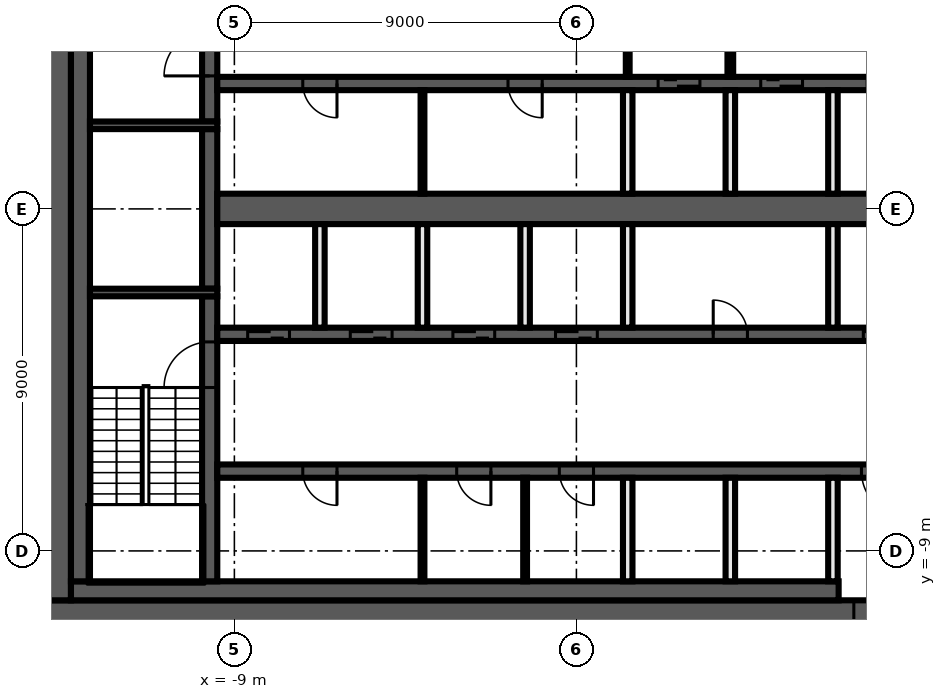
"""IFC4 building model, lengths in metres.
Left out: names, types, materials, properties, quantities, classifications, styles, units other than length and angle.
Written with IfcOpenShell. Run it as: python <this file> out.ifc"""

import sys

from ifc_helpers import new_model, si_unit, direction, frame, frame_2d, origin, place, context, subcontext, project, spatial, rectangle, extrude, element, fill, save


model = new_model("IFC4")
c1 = context("Model", 3, precision=1e-05, world=origin(), true_north=direction((0.0, 1.0)))
c2 = subcontext(c1, "Body", "Model", "MODEL_VIEW")
j1 = project(units=[si_unit("LENGTHUNIT", "METRE"), si_unit("PLANEANGLEUNIT", "RADIAN")], contexts=[c1])
p1 = place(None, origin())
s1 = spatial("IfcSite", under=j1, at=p1, CompositionType="ELEMENT")
p2 = place(p1, origin())
s2 = spatial("IfcBuilding", under=s1, at=p2, CompositionType="ELEMENT")
p3 = place(p2, frame((0.0, 0.0, 245.4)))
s3 = spatial("IfcBuildingStorey", under=s2, at=p3, CompositionType="ELEMENT", Elevation=245.4)
p4 = place(p3, frame((14.0, -10.65, 0.0), z_axis=(0.0, 0.0, 1.0), x_axis=(-1.0, 0.0, 0.0)))
e1 = element("IfcWall", 1, at=p4, inside=s3, PredefinedType="SHEAR", context=c2, shape_type="SweptSolid", body=[
    extrude(rectangle(XDim=28.0, YDim=0.7, at=frame_2d((14.0, 0.0))), origin(), (0.0, 0.0, 1.0), 3.82),
])
p5 = place(p4, frame((5.1, 0.0, 0.0)))
e2 = element("IfcOpeningElement", 2, at=p5, cuts=e1, PredefinedType="OPENING", context=c2, shape_type="SweptSolid", body=[
    extrude(rectangle(XDim=1.6, YDim=2.1, at=frame_2d((0.8, 1.05))), frame((0.0, 0.36, 0.0), z_axis=(0.0, -1.0, 0.0), x_axis=(1.0, 0.0, 0.0)), (0.0, 0.0, 1.0), 0.72),
])
p6 = place(p3, frame((-13.65, -10.3, 0.0), z_axis=(0.0, 0.0, 1.0), x_axis=(0.0, 1.0, 0.0)))
e3 = element("IfcWall", 3, at=p6, inside=s3, PredefinedType="SHEAR", context=c2, shape_type="SweptSolid", body=[
    extrude(rectangle(XDim=20.6, YDim=0.7, at=frame_2d((10.3, 0.0))), origin(), (0.0, 0.0, 1.0), 3.82),
])
p7 = place(p3, frame((6.9, -10.05, 0.0), z_axis=(0.0, 0.0, 1.0), x_axis=(-1.0, 0.0, 0.0)))
e4 = element("IfcWall", 4, at=p7, inside=s3, PredefinedType="SHEAR", context=c2, shape_type="SweptSolid", body=[
    extrude(rectangle(XDim=20.2, YDim=0.5, at=frame_2d((10.1, 0.0))), origin(), (0.0, 0.0, 1.0), 3.82),
])
p8 = place(p3, frame((-13.05, -9.8, 0.0), z_axis=(0.0, 0.0, 1.0), x_axis=(0.0, 1.0, 0.0)))
e5 = element("IfcWall", 5, at=p8, inside=s3, PredefinedType="SHEAR", context=c2, shape_type="SweptSolid", body=[
    extrude(rectangle(XDim=19.6, YDim=0.5, at=frame_2d((9.8, 0.0))), origin(), (0.0, 0.0, 1.0), 3.82),
])
p9 = place(p3, frame((-9.65, -9.8, 0.0), z_axis=(0.0, 0.0, 1.0), x_axis=(0.0, 1.0, 0.0)))
e6 = element("IfcWall", 6, at=p9, inside=s3, PredefinedType="SHEAR", context=c2, shape_type="SweptSolid", body=[
    extrude(rectangle(XDim=7.5, YDim=0.4, at=frame_2d((3.75, 0.0))), origin(), (0.0, 0.0, 1.0), 3.82),
])
p10 = place(p9, frame((5.1, 0.0, 0.0)))
e7 = element("IfcOpeningElement", 7, at=p10, cuts=e6, PredefinedType="OPENING", context=c2, shape_type="SweptSolid", body=[
    extrude(rectangle(XDim=1.2, YDim=2.1, at=frame_2d((0.6, 1.05))), frame((0.0, 0.21, 0.0), z_axis=(0.0, -1.0, 0.0), x_axis=(1.0, 0.0, 0.0)), (0.0, 0.0, 1.0), 0.42),
])
p11 = place(p3, frame((-9.65, -2.1, 0.0), z_axis=(0.0, 0.0, 1.0), x_axis=(0.0, 1.0, 0.0)))
e8 = element("IfcWall", 8, at=p11, inside=s3, PredefinedType="SHEAR", context=c2, shape_type="SweptSolid", body=[
    extrude(rectangle(XDim=4.2, YDim=0.4, at=frame_2d((2.1, 0.0))), origin(), (0.0, 0.0, 1.0), 3.82),
])
p12 = place(p3, frame((-9.65, 2.3, 0.0), z_axis=(0.0, 0.0, 1.0), x_axis=(0.0, 1.0, 0.0)))
e9 = element("IfcWall", 9, at=p12, inside=s3, PredefinedType="SHEAR", context=c2, shape_type="SweptSolid", body=[
    extrude(rectangle(XDim=7.5, YDim=0.4, at=frame_2d((3.75, 0.0))), origin(), (0.0, 0.0, 1.0), 3.82),
])
p13 = place(p12, frame((1.2, 0.0, 0.0)))
e10 = element("IfcOpeningElement", 10, at=p13, cuts=e9, PredefinedType="OPENING", context=c2, shape_type="SweptSolid", body=[
    extrude(rectangle(XDim=1.2, YDim=2.1, at=frame_2d((0.6, 1.05))), frame((0.0, 0.21, 0.0), z_axis=(0.0, -1.0, 0.0), x_axis=(1.0, 0.0, 0.0)), (0.0, 0.0, 1.0), 0.42),
])
for number, where, z_axis, x_axis in (
    (11, (-9.45, 2.2, 0.0), (0.0, 0.0, 1.0), (-1.0, 0.0, 0.0)),
    (12, (-9.45, -2.2, 0.0), (0.0, 0.0, 1.0), (-1.0, 0.0, 0.0)),
):
    element("IfcWall", number, at=place(p3, frame(where, z_axis=z_axis, x_axis=x_axis)), inside=s3, PredefinedType="SHEAR", context=c2, shape_type="SweptSolid", body=[
        extrude(rectangle(XDim=3.35, YDim=0.2, at=frame_2d((1.675, 0.0))), origin(), (0.0, 0.0, 1.0), 3.82),
    ])
p14 = place(p3, frame((9.45, 3.3, 0.0), z_axis=(0.0, 0.0, 1.0), x_axis=(-1.0, 0.0, 0.0)))
e13 = element("IfcWall", 13, at=p14, inside=s3, PredefinedType="SHEAR", context=c2, shape_type="SweptSolid", body=[
    extrude(rectangle(XDim=18.9, YDim=0.35, at=frame_2d((9.45, 0.0))), origin(), (0.0, 0.0, 1.0), 3.82),
])
p15 = place(p14, frame((6.2, 0.0, 0.0)))
e14 = element("IfcOpeningElement", 14, at=p15, cuts=e13, PredefinedType="OPENING", context=c2, shape_type="SweptSolid", body=[
    extrude(rectangle(XDim=1.1, YDim=2.1, at=frame_2d((0.55, 1.05))), frame((0.0, 0.185, 0.0), z_axis=(0.0, -1.0, 0.0), x_axis=(1.0, 0.0, 0.0)), (0.0, 0.0, 1.0), 0.37),
])
p16 = place(p14, frame((3.5, 0.0, 0.0)))
e15 = element("IfcOpeningElement", 15, at=p16, cuts=e13, PredefinedType="OPENING", context=c2, shape_type="SweptSolid", body=[
    extrude(rectangle(XDim=1.1, YDim=2.1, at=frame_2d((0.55, 1.05))), frame((0.0, 0.185, 0.0), z_axis=(0.0, -1.0, 0.0), x_axis=(1.0, 0.0, 0.0)), (0.0, 0.0, 1.0), 0.37),
])
p17 = place(p14, frame((0.9, 0.0, 0.0)))
e16 = element("IfcOpeningElement", 16, at=p17, cuts=e13, PredefinedType="OPENING", context=c2, shape_type="SweptSolid", body=[
    extrude(rectangle(XDim=0.9, YDim=2.1, at=frame_2d((0.45, 1.05))), frame((0.0, 0.185, 0.0), z_axis=(0.0, -1.0, 0.0), x_axis=(1.0, 0.0, 0.0)), (0.0, 0.0, 1.0), 0.37),
])
p18 = place(p14, frame((15.75, 0.0, 0.0)))
e17 = element("IfcOpeningElement", 17, at=p18, cuts=e13, PredefinedType="OPENING", context=c2, shape_type="SweptSolid", body=[
    extrude(rectangle(XDim=0.9, YDim=2.1, at=frame_2d((0.45, 1.05))), frame((0.0, 0.185, 0.0), z_axis=(0.0, -1.0, 0.0), x_axis=(1.0, 0.0, 0.0)), (0.0, 0.0, 1.0), 0.37),
])
p19 = place(p14, frame((10.35, 0.0, 0.0)))
e18 = element("IfcOpeningElement", 18, at=p19, cuts=e13, PredefinedType="OPENING", context=c2, shape_type="SweptSolid", body=[
    extrude(rectangle(XDim=0.9, YDim=2.1, at=frame_2d((0.45, 1.05))), frame((0.0, 0.185, 0.0), z_axis=(0.0, -1.0, 0.0), x_axis=(1.0, 0.0, 0.0)), (0.0, 0.0, 1.0), 0.37),
])
p20 = place(p3, frame((-9.45, -3.3, 0.0), z_axis=(0.0, 0.0, 1.0), x_axis=(1.0, 0.0, 0.0)))
e19 = element("IfcWall", 19, at=p20, inside=s3, PredefinedType="SHEAR", context=c2, shape_type="SweptSolid", body=[
    extrude(rectangle(XDim=18.9, YDim=0.35, at=frame_2d((9.45, 0.0))), origin(), (0.0, 0.0, 1.0), 3.82),
])
p21 = place(p20, frame((0.8, 0.0, 0.0)))
e20 = element("IfcOpeningElement", 20, at=p21, cuts=e19, PredefinedType="OPENING", context=c2, shape_type="SweptSolid", body=[
    extrude(rectangle(XDim=1.1, YDim=2.1, at=frame_2d((0.55, 1.05))), frame((0.0, 0.185, 0.0), z_axis=(0.0, -1.0, 0.0), x_axis=(1.0, 0.0, 0.0)), (0.0, 0.0, 1.0), 0.37),
])
p22 = place(p20, frame((3.5, 0.0, 0.0)))
e21 = element("IfcOpeningElement", 21, at=p22, cuts=e19, PredefinedType="OPENING", context=c2, shape_type="SweptSolid", body=[
    extrude(rectangle(XDim=1.1, YDim=2.1, at=frame_2d((0.55, 1.05))), frame((0.0, 0.185, 0.0), z_axis=(0.0, -1.0, 0.0), x_axis=(1.0, 0.0, 0.0)), (0.0, 0.0, 1.0), 0.37),
])
p23 = place(p20, frame((6.2, 0.0, 0.0)))
e22 = element("IfcOpeningElement", 22, at=p23, cuts=e19, PredefinedType="OPENING", context=c2, shape_type="SweptSolid", body=[
    extrude(rectangle(XDim=1.1, YDim=2.1, at=frame_2d((0.55, 1.05))), frame((0.0, 0.185, 0.0), z_axis=(0.0, -1.0, 0.0), x_axis=(1.0, 0.0, 0.0)), (0.0, 0.0, 1.0), 0.37),
])
p24 = place(p20, frame((8.9, 0.0, 0.0)))
e23 = element("IfcOpeningElement", 23, at=p24, cuts=e19, PredefinedType="OPENING", context=c2, shape_type="SweptSolid", body=[
    extrude(rectangle(XDim=1.1, YDim=2.1, at=frame_2d((0.55, 1.05))), frame((0.0, 0.185, 0.0), z_axis=(0.0, -1.0, 0.0), x_axis=(1.0, 0.0, 0.0)), (0.0, 0.0, 1.0), 0.37),
])
p25 = place(p20, frame((17.0, 0.0, 0.0)))
e24 = element("IfcOpeningElement", 24, at=p25, cuts=e19, PredefinedType="OPENING", context=c2, shape_type="SweptSolid", body=[
    extrude(rectangle(XDim=1.1, YDim=2.1, at=frame_2d((0.55, 1.05))), frame((0.0, 0.185, 0.0), z_axis=(0.0, -1.0, 0.0), x_axis=(1.0, 0.0, 0.0)), (0.0, 0.0, 1.0), 0.37),
])
p26 = place(p20, frame((13.05, 0.0, 0.0)))
e25 = element("IfcOpeningElement", 25, at=p26, cuts=e19, PredefinedType="OPENING", context=c2, shape_type="SweptSolid", body=[
    extrude(rectangle(XDim=0.9, YDim=2.1, at=frame_2d((0.45, 1.05))), frame((0.0, 0.185, 0.0), z_axis=(0.0, -1.0, 0.0), x_axis=(1.0, 0.0, 0.0)), (0.0, 0.0, 1.0), 0.37),
])
p27 = place(p3, frame((9.45, -6.9, 0.0), z_axis=(0.0, 0.0, 1.0), x_axis=(-1.0, 0.0, 0.0)))
e26 = element("IfcWall", 26, at=p27, inside=s3, PredefinedType="SHEAR", context=c2, shape_type="SweptSolid", body=[
    extrude(rectangle(XDim=18.9, YDim=0.35, at=frame_2d((9.45, 0.0))), origin(), (0.0, 0.0, 1.0), 3.82),
])
p28 = place(p27, frame((0.75, 0.0, 0.0)))
e27 = element("IfcOpeningElement", 27, at=p28, cuts=e26, PredefinedType="OPENING", context=c2, shape_type="SweptSolid", body=[
    extrude(rectangle(XDim=1.2, YDim=2.1, at=frame_2d((0.6, 1.05))), frame((0.0, 0.185, 0.0), z_axis=(0.0, -1.0, 0.0), x_axis=(1.0, 0.0, 0.0)), (0.0, 0.0, 1.0), 0.37),
])
p29 = place(p27, frame((15.75, 0.0, 0.0)))
e28 = element("IfcOpeningElement", 28, at=p29, cuts=e26, PredefinedType="OPENING", context=c2, shape_type="SweptSolid", body=[
    extrude(rectangle(XDim=0.9, YDim=2.1, at=frame_2d((0.45, 1.05))), frame((0.0, 0.185, 0.0), z_axis=(0.0, -1.0, 0.0), x_axis=(1.0, 0.0, 0.0)), (0.0, 0.0, 1.0), 0.37),
])
p30 = place(p27, frame((11.7, 0.0, 0.0)))
e29 = element("IfcOpeningElement", 29, at=p30, cuts=e26, PredefinedType="OPENING", context=c2, shape_type="SweptSolid", body=[
    extrude(rectangle(XDim=0.9, YDim=2.1, at=frame_2d((0.45, 1.05))), frame((0.0, 0.185, 0.0), z_axis=(0.0, -1.0, 0.0), x_axis=(1.0, 0.0, 0.0)), (0.0, 0.0, 1.0), 0.37),
])
p31 = place(p27, frame((9.0, 0.0, 0.0)))
e30 = element("IfcOpeningElement", 30, at=p31, cuts=e26, PredefinedType="OPENING", context=c2, shape_type="SweptSolid", body=[
    extrude(rectangle(XDim=0.9, YDim=2.1, at=frame_2d((0.45, 1.05))), frame((0.0, 0.185, 0.0), z_axis=(0.0, -1.0, 0.0), x_axis=(1.0, 0.0, 0.0)), (0.0, 0.0, 1.0), 0.37),
])
p32 = place(p3, frame((-9.45, 0.0, 0.0), z_axis=(0.0, 0.0, 1.0), x_axis=(1.0, 0.0, 0.0)))
e31 = element("IfcWall", 31, at=p32, inside=s3, PredefinedType="SHEAR", context=c2, shape_type="SweptSolid", body=[
    extrude(rectangle(XDim=18.9, YDim=0.8, at=frame_2d((9.45, 0.0))), origin(), (0.0, 0.0, 1.0), 3.82),
])
for number, where, z_axis, x_axis in (
    (32, (6.75, -9.8, 0.0), (0.0, 0.0, 1.0), (0.0, 1.0, 0.0)),
    (33, (6.75, -3.125, 0.0), (0.0, 0.0, 1.0), (0.0, 1.0, 0.0)),
    (34, (6.75, 0.4, 0.0), (0.0, 0.0, 1.0), (0.0, 1.0, 0.0)),
):
    element("IfcWall", number, at=place(p3, frame(where, z_axis=z_axis, x_axis=x_axis)), inside=s3, PredefinedType="SOLIDWALL", context=c2, shape_type="SweptSolid", body=[
        extrude(rectangle(XDim=2.725, YDim=0.25, at=frame_2d((1.363, 0.0))), origin(), (0.0, 0.0, 1.0), 3.82),
    ])
p33 = place(p3, frame((4.05, 6.725, 0.0), z_axis=(0.0, 0.0, 1.0), x_axis=(0.0, -1.0, 0.0)))
e35 = element("IfcWall", 35, at=p33, inside=s3, PredefinedType="PARTITIONING", context=c2, shape_type="SweptSolid", body=[
    extrude(rectangle(XDim=3.25, YDim=0.15, at=frame_2d((1.625, 0.0))), origin(), (0.0, 0.0, 1.0), 3.82),
])
p34 = place(p33, frame((1.025, 0.0, 0.0)))
e36 = element("IfcOpeningElement", 36, at=p34, cuts=e35, PredefinedType="OPENING", context=c2, shape_type="SweptSolid", body=[
    extrude(rectangle(XDim=1.2, YDim=2.1, at=frame_2d((0.6, 1.05))), frame((0.0, 0.085, 0.0), z_axis=(0.0, -1.0, 0.0), x_axis=(1.0, 0.0, 0.0)), (0.0, 0.0, 1.0), 0.17),
])
for number, where, z_axis, x_axis in (
    (37, (4.05, -9.8, 0.0), (0.0, 0.0, 1.0), (0.0, 1.0, 0.0)),
    (38, (4.05, 0.4, 0.0), (0.0, 0.0, 1.0), (0.0, 1.0, 0.0)),
):
    element("IfcWall", number, at=place(p3, frame(where, z_axis=z_axis, x_axis=x_axis)), inside=s3, PredefinedType="SOLIDWALL", context=c2, shape_type="SweptSolid", body=[
        extrude(rectangle(XDim=2.725, YDim=0.25, at=frame_2d((1.363, 0.0))), origin(), (0.0, 0.0, 1.0), 3.82),
    ])
p35 = place(p3, frame((1.35, 6.725, 0.0), z_axis=(0.0, 0.0, 1.0), x_axis=(0.0, -1.0, 0.0)))
e39 = element("IfcWall", 39, at=p35, inside=s3, PredefinedType="PARTITIONING", context=c2, shape_type="SweptSolid", body=[
    extrude(rectangle(XDim=3.25, YDim=0.1, at=frame_2d((1.625, 0.0))), origin(), (0.0, 0.0, 1.0), 3.82),
])
p36 = place(p35, frame((1.025, 0.0, 0.0)))
e40 = element("IfcOpeningElement", 40, at=p36, cuts=e39, PredefinedType="OPENING", context=c2, shape_type="SweptSolid", body=[
    extrude(rectangle(XDim=1.2, YDim=2.1, at=frame_2d((0.6, 1.05))), frame((0.0, 0.06, 0.0), z_axis=(0.0, -1.0, 0.0), x_axis=(1.0, 0.0, 0.0)), (0.0, 0.0, 1.0), 0.12),
])
for number, where, z_axis, x_axis in (
    (41, (1.35, -9.8, 0.0), (0.0, 0.0, 1.0), (0.0, 1.0, 0.0)),
    (42, (1.35, -3.125, 0.0), (0.0, 0.0, 1.0), (0.0, 1.0, 0.0)),
    (43, (1.35, 0.4, 0.0), (0.0, 0.0, 1.0), (0.0, 1.0, 0.0)),
):
    element("IfcWall", number, at=place(p3, frame(where, z_axis=z_axis, x_axis=x_axis)), inside=s3, PredefinedType="SOLIDWALL", context=c2, shape_type="SweptSolid", body=[
        extrude(rectangle(XDim=2.725, YDim=0.25, at=frame_2d((1.363, 0.0))), origin(), (0.0, 0.0, 1.0), 3.82),
    ])
p37 = place(p3, frame((-1.35, -9.8, 0.0), z_axis=(0.0, 0.0, 1.0), x_axis=(0.0, 1.0, 0.0)))
e44 = element("IfcWall", 44, at=p37, inside=s3, PredefinedType="PARTITIONING", context=c2, shape_type="SweptSolid", body=[
    extrude(rectangle(XDim=2.725, YDim=0.1, at=frame_2d((1.363, 0.0))), origin(), (0.0, 0.0, 1.0), 3.82),
])
p38 = place(p3, frame((-1.35, -3.125, 0.0), z_axis=(0.0, 0.0, 1.0), x_axis=(0.0, 1.0, 0.0)))
e45 = element("IfcWall", 45, at=p38, inside=s3, PredefinedType="SOLIDWALL", context=c2, shape_type="SweptSolid", body=[
    extrude(rectangle(XDim=2.725, YDim=0.25, at=frame_2d((1.363, 0.0))), origin(), (0.0, 0.0, 1.0), 3.82),
])
for number, where, z_axis, x_axis in (
    (46, (-4.05, -9.8, 0.0), (0.0, 0.0, 1.0), (0.0, 1.0, 0.0)),
    (47, (-4.05, 0.4, 0.0), (0.0, 0.0, 1.0), (0.0, 1.0, 0.0)),
):
    element("IfcWall", number, at=place(p3, frame(where, z_axis=z_axis, x_axis=x_axis)), inside=s3, PredefinedType="PARTITIONING", context=c2, shape_type="SweptSolid", body=[
        extrude(rectangle(XDim=2.725, YDim=0.1, at=frame_2d((1.363, 0.0))), origin(), (0.0, 0.0, 1.0), 3.82),
    ])
for number, where, z_axis, x_axis in (
    (48, (-4.05, -3.125, 0.0), (0.0, 0.0, 1.0), (0.0, 1.0, 0.0)),
    (49, (-6.75, -3.125, 0.0), (0.0, 0.0, 1.0), (0.0, 1.0, 0.0)),
):
    element("IfcWall", number, at=place(p3, frame(where, z_axis=z_axis, x_axis=x_axis)), inside=s3, PredefinedType="SOLIDWALL", context=c2, shape_type="SweptSolid", body=[
        extrude(rectangle(XDim=2.725, YDim=0.25, at=frame_2d((1.363, 0.0))), origin(), (0.0, 0.0, 1.0), 3.82),
    ])
p39 = place(p15, origin())
e50 = element("IfcDoor", 50, at=p39, inside=s3, OperationType="DOUBLE_DOOR_SLIDING", PredefinedType="DOOR", context=c2, shape_type="SweptSolid", body=[
    extrude(rectangle(XDim=1.1, YDim=2.1, at=frame_2d((0.55, 1.05))), frame((0.0, 0.025, 0.0), z_axis=(0.0, -1.0, 0.0), x_axis=(1.0, 0.0, 0.0)), (0.0, 0.0, 1.0), 0.05),
])
fill(e14, e50)
p40 = place(p16, origin())
e51 = element("IfcDoor", 51, at=p40, inside=s3, OperationType="DOUBLE_DOOR_SLIDING", PredefinedType="DOOR", context=c2, shape_type="SweptSolid", body=[
    extrude(rectangle(XDim=1.1, YDim=2.1, at=frame_2d((0.55, 1.05))), frame((0.0, 0.025, 0.0), z_axis=(0.0, -1.0, 0.0), x_axis=(1.0, 0.0, 0.0)), (0.0, 0.0, 1.0), 0.05),
])
fill(e15, e51)
p41 = place(p21, origin())
e52 = element("IfcDoor", 52, at=p41, inside=s3, OperationType="DOUBLE_DOOR_SLIDING", PredefinedType="DOOR", context=c2, shape_type="SweptSolid", body=[
    extrude(rectangle(XDim=1.1, YDim=2.1, at=frame_2d((0.55, 1.05))), frame((0.0, 0.025, 0.0), z_axis=(0.0, -1.0, 0.0), x_axis=(1.0, 0.0, 0.0)), (0.0, 0.0, 1.0), 0.05),
])
fill(e20, e52)
p42 = place(p22, origin())
e53 = element("IfcDoor", 53, at=p42, inside=s3, OperationType="DOUBLE_DOOR_SLIDING", PredefinedType="DOOR", context=c2, shape_type="SweptSolid", body=[
    extrude(rectangle(XDim=1.1, YDim=2.1, at=frame_2d((0.55, 1.05))), frame((0.0, 0.025, 0.0), z_axis=(0.0, -1.0, 0.0), x_axis=(1.0, 0.0, 0.0)), (0.0, 0.0, 1.0), 0.05),
])
fill(e21, e53)
p43 = place(p23, origin())
e54 = element("IfcDoor", 54, at=p43, inside=s3, OperationType="DOUBLE_DOOR_SLIDING", PredefinedType="DOOR", context=c2, shape_type="SweptSolid", body=[
    extrude(rectangle(XDim=1.1, YDim=2.1, at=frame_2d((0.55, 1.05))), frame((0.0, 0.025, 0.0), z_axis=(0.0, -1.0, 0.0), x_axis=(1.0, 0.0, 0.0)), (0.0, 0.0, 1.0), 0.05),
])
fill(e22, e54)
p44 = place(p24, origin())
e55 = element("IfcDoor", 55, at=p44, inside=s3, OperationType="DOUBLE_DOOR_SLIDING", PredefinedType="DOOR", context=c2, shape_type="SweptSolid", body=[
    extrude(rectangle(XDim=1.1, YDim=2.1, at=frame_2d((0.55, 1.05))), frame((0.0, 0.025, 0.0), z_axis=(0.0, -1.0, 0.0), x_axis=(1.0, 0.0, 0.0)), (0.0, 0.0, 1.0), 0.05),
])
fill(e23, e55)
p45 = place(p25, origin())
e56 = element("IfcDoor", 56, at=p45, inside=s3, OperationType="DOUBLE_DOOR_SLIDING", PredefinedType="DOOR", context=c2, shape_type="SweptSolid", body=[
    extrude(rectangle(XDim=1.1, YDim=2.1, at=frame_2d((0.55, 1.05))), frame((0.0, 0.025, 0.0), z_axis=(0.0, -1.0, 0.0), x_axis=(1.0, 0.0, 0.0)), (0.0, 0.0, 1.0), 0.05),
])
fill(e24, e56)
p46 = place(p5, origin())
e57 = element("IfcDoor", 57, at=p46, inside=s3, OperationType="DOUBLE_DOOR_SINGLE_SWING", PredefinedType="DOOR", context=c2, shape_type="SweptSolid", body=[
    extrude(rectangle(XDim=1.6, YDim=2.1, at=frame_2d((0.8, 1.05))), frame((0.0, 0.025, 0.0), z_axis=(0.0, -1.0, 0.0), x_axis=(1.0, 0.0, 0.0)), (0.0, 0.0, 1.0), 0.05),
])
fill(e2, e57)
p47 = place(p28, origin())
e58 = element("IfcDoor", 58, at=p47, inside=s3, OperationType="SINGLE_SWING_LEFT", PredefinedType="DOOR", context=c2, shape_type="SweptSolid", body=[
    extrude(rectangle(XDim=1.2, YDim=2.1, at=frame_2d((0.6, 1.05))), frame((0.0, 0.025, 0.0), z_axis=(0.0, -1.0, 0.0), x_axis=(1.0, 0.0, 0.0)), (0.0, 0.0, 1.0), 0.05),
])
fill(e27, e58)
p48 = place(p18, origin())
e59 = element("IfcDoor", 59, at=p48, inside=s3, OperationType="SINGLE_SWING_RIGHT", PredefinedType="DOOR", context=c2, shape_type="SweptSolid", body=[
    extrude(rectangle(XDim=0.9, YDim=2.1, at=frame_2d((0.45, 1.05))), frame((0.0, 0.025, 0.0), z_axis=(0.0, -1.0, 0.0), x_axis=(1.0, 0.0, 0.0)), (0.0, 0.0, 1.0), 0.05),
])
fill(e17, e59)
p49 = place(p19, origin())
e60 = element("IfcDoor", 60, at=p49, inside=s3, OperationType="SINGLE_SWING_LEFT", PredefinedType="DOOR", context=c2, shape_type="SweptSolid", body=[
    extrude(rectangle(XDim=0.9, YDim=2.1, at=frame_2d((0.45, 1.05))), frame((0.0, 0.025, 0.0), z_axis=(0.0, -1.0, 0.0), x_axis=(1.0, 0.0, 0.0)), (0.0, 0.0, 1.0), 0.05),
])
fill(e18, e60)
p50 = place(p26, origin())
e61 = element("IfcDoor", 61, at=p50, inside=s3, OperationType="SINGLE_SWING_RIGHT", PredefinedType="DOOR", context=c2, shape_type="SweptSolid", body=[
    extrude(rectangle(XDim=0.9, YDim=2.1, at=frame_2d((0.45, 1.05))), frame((0.0, 0.025, 0.0), z_axis=(0.0, -1.0, 0.0), x_axis=(1.0, 0.0, 0.0)), (0.0, 0.0, 1.0), 0.05),
])
fill(e25, e61)
p51 = place(p29, origin())
e62 = element("IfcDoor", 62, at=p51, inside=s3, OperationType="SINGLE_SWING_LEFT", PredefinedType="DOOR", context=c2, shape_type="SweptSolid", body=[
    extrude(rectangle(XDim=0.9, YDim=2.1, at=frame_2d((0.45, 1.05))), frame((0.0, 0.025, 0.0), z_axis=(0.0, -1.0, 0.0), x_axis=(1.0, 0.0, 0.0)), (0.0, 0.0, 1.0), 0.05),
])
fill(e28, e62)
p52 = place(p30, origin())
e63 = element("IfcDoor", 63, at=p52, inside=s3, OperationType="SINGLE_SWING_RIGHT", PredefinedType="DOOR", context=c2, shape_type="SweptSolid", body=[
    extrude(rectangle(XDim=0.9, YDim=2.1, at=frame_2d((0.45, 1.05))), frame((0.0, 0.025, 0.0), z_axis=(0.0, -1.0, 0.0), x_axis=(1.0, 0.0, 0.0)), (0.0, 0.0, 1.0), 0.05),
])
fill(e29, e63)
p53 = place(p31, origin())
e64 = element("IfcDoor", 64, at=p53, inside=s3, OperationType="SINGLE_SWING_LEFT", PredefinedType="DOOR", context=c2, shape_type="SweptSolid", body=[
    extrude(rectangle(XDim=0.9, YDim=2.1, at=frame_2d((0.45, 1.05))), frame((0.0, 0.025, 0.0), z_axis=(0.0, -1.0, 0.0), x_axis=(1.0, 0.0, 0.0)), (0.0, 0.0, 1.0), 0.05),
])
fill(e30, e64)
p54 = place(p13, origin())
e65 = element("IfcDoor", 65, at=p54, inside=s3, OperationType="SINGLE_SWING_RIGHT", PredefinedType="DOOR", context=c2, shape_type="SweptSolid", body=[
    extrude(rectangle(XDim=1.2, YDim=2.1, at=frame_2d((0.6, 1.05))), frame((0.0, 0.025, 0.0), z_axis=(0.0, -1.0, 0.0), x_axis=(1.0, 0.0, 0.0)), (0.0, 0.0, 1.0), 0.05),
])
fill(e10, e65)
p55 = place(p10, origin())
e66 = element("IfcDoor", 66, at=p55, inside=s3, OperationType="SINGLE_SWING_LEFT", PredefinedType="DOOR", context=c2, shape_type="SweptSolid", body=[
    extrude(rectangle(XDim=1.2, YDim=2.1, at=frame_2d((0.6, 1.05))), frame((0.0, 0.025, 0.0), z_axis=(0.0, -1.0, 0.0), x_axis=(1.0, 0.0, 0.0)), (0.0, 0.0, 1.0), 0.05),
])
fill(e7, e66)
save(model, sys.argv[1])
